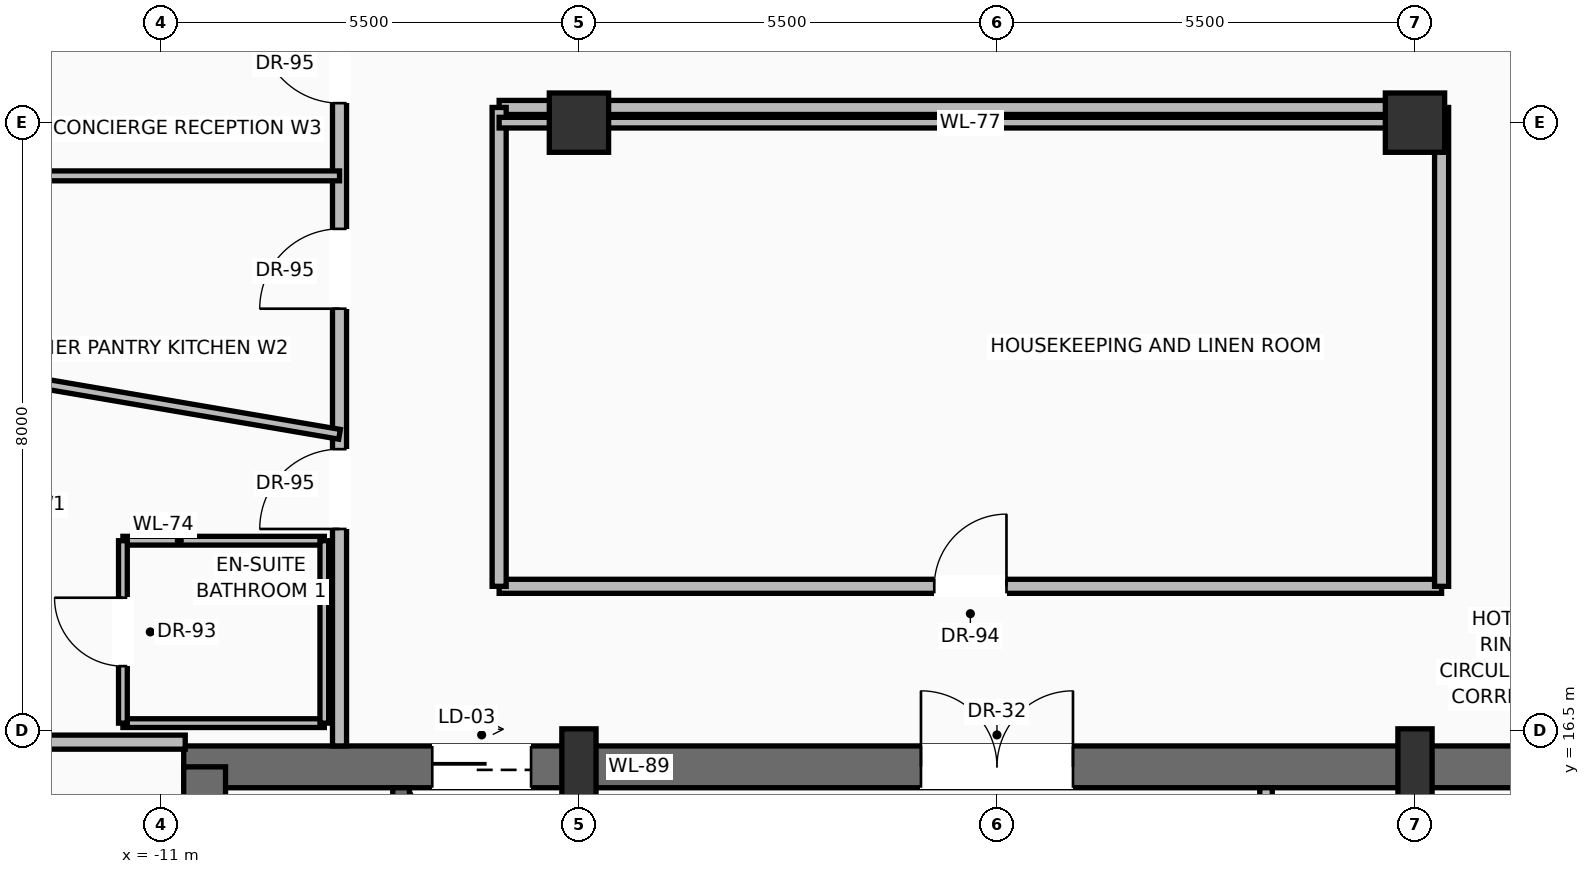
"""IFC4 building model, lengths in metres.
Left out: names, types, materials, properties, quantities, classifications, styles, units other than length and angle.
Written with IfcOpenShell. Run it as: python <this file> out.ifc"""

import sys

from ifc_helpers import new_model, si_unit, direction, frame, frame_2d, origin, origin_2d, place, context, subcontext, project, spatial, rectangle, extrude, source, transform, mapped, element, fill, save


model = new_model("IFC4")
c1 = context("Model", 3, precision=1e-05, world=origin(), true_north=direction((0.0, 1.0)))
c2 = subcontext(c1, "Body", "Model", "MODEL_VIEW")
j1 = project(units=[si_unit("LENGTHUNIT", "METRE"), si_unit("PLANEANGLEUNIT", "RADIAN")], contexts=[c1])
p1 = place(None, origin())
s1 = spatial("IfcSite", under=j1, at=p1, CompositionType="ELEMENT")
p2 = place(p1, origin())
s2 = spatial("IfcBuilding", under=s1, at=p2, CompositionType="ELEMENT")
p3 = place(p2, frame((0.0, 0.0, 237.25)))
s3 = spatial("IfcBuildingStorey", under=s2, at=p3, CompositionType="ELEMENT", Elevation=237.25)
p4 = place(p3, frame((-10.7, 16.025, 0.0), z_axis=(0.0, 0.0, 1.0), x_axis=(1.0, 0.0, 0.0)))
e1 = element("IfcWall", 1, at=p4, inside=s3, PredefinedType="SHEAR", context=c2, shape_type="SweptSolid", body=[
    extrude(rectangle(XDim=21.4, YDim=0.55, at=frame_2d((10.7, 0.0))), origin(), (0.0, 0.0, 1.0), 3.24),
])
p5 = place(p4, frame((3.27, 0.0, 0.0)))
e2 = element("IfcOpeningElement", 2, at=p5, cuts=e1, PredefinedType="OPENING", context=c2, shape_type="SweptSolid", body=[
    extrude(rectangle(XDim=1.3, YDim=2.3, at=frame_2d((0.65, 1.15))), frame((0.0, 0.285, 0.0), z_axis=(0.0, -1.0, 0.0), x_axis=(1.0, 0.0, 0.0)), (0.0, 0.0, 1.0), 0.57),
])
p6 = place(p4, frame((9.7, 0.0, 0.0)))
e3 = element("IfcOpeningElement", 3, at=p6, cuts=e1, PredefinedType="OPENING", context=c2, shape_type="SweptSolid", body=[
    extrude(rectangle(XDim=2.0, YDim=2.4, at=frame_2d((1.0, 1.2))), frame((0.0, 0.285, 0.0), z_axis=(0.0, -1.0, 0.0), x_axis=(1.0, 0.0, 0.0)), (0.0, 0.0, 1.0), 0.57),
])
p7 = place(p3, frame((-10.425, 0.575, 0.0), z_axis=(0.0, 0.0, 1.0), x_axis=(0.0, 1.0, 0.0)))
e4 = element("IfcWall", 4, at=p7, inside=s3, PredefinedType="SHEAR", context=c2, shape_type="SweptSolid", body=[
    extrude(rectangle(XDim=15.45, YDim=0.55, at=frame_2d((7.725, 0.0))), origin(), (0.0, 0.0, 1.0), 3.24),
])
p8 = place(p3, frame((-5.5, 0.575, 0.0), z_axis=(0.0, 0.0, 1.0), x_axis=(0.0, 1.0, 0.0)))
e5 = element("IfcWall", 5, at=p8, inside=s3, PredefinedType="SHEAR", context=c2, shape_type="SweptSolid", body=[
    extrude(rectangle(XDim=15.45, YDim=0.4, at=frame_2d((7.725, 0.0))), origin(), (0.0, 0.0, 1.0), 3.24),
])
p9 = place(p8, frame((8.925, 0.0, 0.0)))
e6 = element("IfcOpeningElement", 6, at=p9, cuts=e5, PredefinedType="OPENING", context=c2, shape_type="SweptSolid", body=[
    extrude(rectangle(XDim=1.1, YDim=2.2, at=frame_2d((0.55, 1.1))), frame((0.0, 0.21, 0.0), z_axis=(0.0, -1.0, 0.0), x_axis=(1.0, 0.0, 0.0)), (0.0, 0.0, 1.0), 0.42),
])
p10 = place(p3, frame((5.5, 0.575, 0.0), z_axis=(0.0, 0.0, 1.0), x_axis=(0.0, 1.0, 0.0)))
e7 = element("IfcWall", 7, at=p10, inside=s3, PredefinedType="SHEAR", context=c2, shape_type="SweptSolid", body=[
    extrude(rectangle(XDim=15.45, YDim=0.4, at=frame_2d((7.725, 0.0))), origin(), (0.0, 0.0, 1.0), 3.24),
])
p11 = place(p10, frame((8.925, 0.0, 0.0)))
e8 = element("IfcOpeningElement", 8, at=p11, cuts=e7, PredefinedType="OPENING", context=c2, shape_type="SweptSolid", body=[
    extrude(rectangle(XDim=1.1, YDim=2.2, at=frame_2d((0.55, 1.1))), frame((0.0, 0.21, 0.0), z_axis=(0.0, -1.0, 0.0), x_axis=(1.0, 0.0, 0.0)), (0.0, 0.0, 1.0), 0.42),
])
m1 = source(origin(), c2, "Body", "SweptSolid", [
    extrude(rectangle(XDim=0.45, YDim=0.95, at=origin_2d()), origin(), (0.0, 0.0, 1.0), 3.45),
])
for number, where, z_axis, x_axis in (
    (9, (-5.5, 16.05, 0.0), (0.0, 0.0, 1.0), (1.0, 0.0, 0.0)),
    (10, (5.5, 16.05, 0.0), (0.0, 0.0, 1.0), (1.0, 0.0, 0.0)),
):
    element("IfcColumn", number, at=place(p3, frame(where, z_axis=z_axis, x_axis=x_axis)), inside=s3, PredefinedType="PILASTER", context=c2, shape_type="MappedRepresentation", body=[
        mapped(m1, transform((0.0, 0.0, 0.0), scale=1.0)),
    ])
m2 = source(origin(), c2, "Body", "SweptSolid", [
    extrude(rectangle(XDim=0.78, YDim=0.78, at=origin_2d()), origin(), (0.0, 0.0, 1.0), 3.45),
])
for number, where, z_axis, x_axis in (
    (11, (-5.5, 24.5, 0.0), (0.0, 0.0, 1.0), (1.0, 0.0, 0.0)),
    (12, (5.5, 24.5, 0.0), (0.0, 0.0, 1.0), (1.0, 0.0, 0.0)),
):
    element("IfcColumn", number, at=place(p3, frame(where, z_axis=z_axis, x_axis=x_axis)), inside=s3, PredefinedType="COLUMN", context=c2, shape_type="MappedRepresentation", body=[
        mapped(m2, transform((0.0, 0.0, 0.0), scale=1.0)),
    ])
p12 = place(p3, frame((-19.43, 15.137, 0.0), z_axis=(0.0, 0.0, 1.0), x_axis=(0.508699873742, 0.860943922944, 0.0)))
e13 = element("IfcWall", 13, at=p12, inside=s3, PredefinedType="SOLIDWALL", context=c2, shape_type="SweptSolid", body=[
    extrude(rectangle(XDim=19.559, YDim=0.28, at=frame_2d((9.779, 0.0))), origin(), (0.0, 0.0, 1.0), 2.82),
])
p13 = place(p12, frame((4.694, 0.0, 0.0)))
e14 = element("IfcOpeningElement", 14, at=p13, cuts=e13, PredefinedType="OPENING", context=c2, shape_type="SweptSolid", body=[
    extrude(rectangle(XDim=1.6, YDim=2.35, at=frame_2d((0.8, 1.175))), frame((0.0, 0.15, 0.0), z_axis=(0.0, -1.0, 0.0), x_axis=(1.0, 0.0, 0.0)), (0.0, 0.0, 1.0), 0.3),
])
p14 = place(p12, frame((13.3, 0.0, 0.9)))
e15 = element("IfcOpeningElement", 15, at=p14, cuts=e13, PredefinedType="OPENING", context=c2, shape_type="SweptSolid", body=[
    extrude(rectangle(XDim=1.55, YDim=1.75, at=frame_2d((0.775, 0.875))), frame((0.0, 0.15, 0.0), z_axis=(0.0, -1.0, 0.0), x_axis=(1.0, 0.0, 0.0)), (0.0, 0.0, 1.0), 0.3),
])
p15 = place(p3, frame((-7.84, 11.87, 0.0), z_axis=(0.0, 0.0, 1.0), x_axis=(0.0, 1.0, 0.0)))
e16 = element("IfcWall", 16, at=p15, inside=s3, PredefinedType="SOLIDWALL", context=c2, shape_type="SweptSolid", body=[
    extrude(rectangle(XDim=3.88, YDim=0.22, at=frame_2d((1.94, 0.0))), origin(), (0.0, 0.0, 1.0), 3.24),
])
p16 = place(p3, frame((3.54, 11.22, 0.0), z_axis=(0.0, 0.0, 1.0), x_axis=(0.0, 1.0, 0.0)))
e17 = element("IfcWall", 17, at=p16, inside=s3, PredefinedType="PARTITIONING", context=c2, shape_type="SweptSolid", body=[
    extrude(rectangle(XDim=4.53, YDim=0.165, at=frame_2d((2.265, 0.0))), origin(), (0.0, 0.0, 1.0), 3.232),
])
p17 = place(p16, frame((1.25, 0.0, 0.0)))
e18 = element("IfcOpeningElement", 18, at=p17, cuts=e17, PredefinedType="OPENING", context=c2, shape_type="SweptSolid", body=[
    extrude(rectangle(XDim=0.9, YDim=2.1, at=frame_2d((0.45, 1.05))), frame((0.0, 0.093, 0.0), z_axis=(0.0, -1.0, 0.0), x_axis=(1.0, 0.0, 0.0)), (0.0, 0.0, 1.0), 0.185),
])
p18 = place(p3, frame((-6.55, 18.4, 0.0), z_axis=(0.0, 0.0, 1.0), x_axis=(1.0, 0.0, 0.0)))
e19 = element("IfcWall", 19, at=p18, inside=s3, PredefinedType="PARTITIONING", context=c2, shape_type="SweptSolid", body=[
    extrude(rectangle(XDim=12.4, YDim=0.185, at=frame_2d((6.2, 0.0))), origin(), (0.0, 0.0, 1.0), 3.232),
])
p19 = place(p18, frame((5.725, 0.0, 0.0)))
e20 = element("IfcOpeningElement", 20, at=p19, cuts=e19, PredefinedType="OPENING", context=c2, shape_type="SweptSolid", body=[
    extrude(rectangle(XDim=0.95, YDim=2.2, at=frame_2d((0.475, 1.1))), frame((0.0, 0.103, 0.0), z_axis=(0.0, -1.0, 0.0), x_axis=(1.0, 0.0, 0.0)), (0.0, 0.0, 1.0), 0.205),
])
p20 = place(p3, frame((-6.55, 24.7, 0.0), z_axis=(0.0, 0.0, 1.0), x_axis=(1.0, 0.0, 0.0)))
e21 = element("IfcWall", 21, at=p20, inside=s3, PredefinedType="PARTITIONING", context=c2, shape_type="SweptSolid", body=[
    extrude(rectangle(XDim=12.4, YDim=0.185, at=frame_2d((6.2, 0.0))), origin(), (0.0, 0.0, 1.0), 2.683),
])
for number, where, z_axis, x_axis in (
    (22, (-6.55, 18.4, 0.0), (0.0, 0.0, 1.0), (0.0, 1.0, 0.0)),
    (23, (5.85, 18.4, 0.0), (0.0, 0.0, 1.0), (0.0, 1.0, 0.0)),
):
    element("IfcWall", number, at=place(p3, frame(where, z_axis=z_axis, x_axis=x_axis)), inside=s3, PredefinedType="PARTITIONING", context=c2, shape_type="SweptSolid", body=[
        extrude(rectangle(XDim=6.3, YDim=0.185, at=frame_2d((3.15, 0.0))), origin(), (0.0, 0.0, 1.0), 3.232),
    ])
p21 = place(p3, frame((-8.65, 16.3, 0.0), z_axis=(0.0, 0.0, 1.0), x_axis=(0.0, 1.0, 0.0)))
e24 = element("IfcWall", 24, at=p21, inside=s3, PredefinedType="PARTITIONING", context=c2, shape_type="SweptSolid", body=[
    extrude(rectangle(XDim=10.5, YDim=0.185, at=frame_2d((5.25, 0.0))), origin(), (0.0, 0.0, 1.0), 3.232),
])
p22 = place(p21, frame((2.854, 0.0, 0.0)))
e25 = element("IfcOpeningElement", 25, at=p22, cuts=e24, PredefinedType="OPENING", context=c2, shape_type="SweptSolid", body=[
    extrude(rectangle(XDim=1.05, YDim=2.25, at=frame_2d((0.525, 1.125))), frame((0.0, 0.103, 0.0), z_axis=(0.0, -1.0, 0.0), x_axis=(1.0, 0.0, 0.0)), (0.0, 0.0, 1.0), 0.205),
])
p23 = place(p21, frame((5.752, 0.0, 0.0)))
e26 = element("IfcOpeningElement", 26, at=p23, cuts=e24, PredefinedType="OPENING", context=c2, shape_type="SweptSolid", body=[
    extrude(rectangle(XDim=1.05, YDim=2.25, at=frame_2d((0.525, 1.125))), frame((0.0, 0.103, 0.0), z_axis=(0.0, -1.0, 0.0), x_axis=(1.0, 0.0, 0.0)), (0.0, 0.0, 1.0), 0.205),
])
p24 = place(p21, frame((8.457, 0.0, 0.0)))
e27 = element("IfcOpeningElement", 27, at=p24, cuts=e24, PredefinedType="OPENING", context=c2, shape_type="SweptSolid", body=[
    extrude(rectangle(XDim=1.05, YDim=2.25, at=frame_2d((0.525, 1.125))), frame((0.0, 0.103, 0.0), z_axis=(0.0, -1.0, 0.0), x_axis=(1.0, 0.0, 0.0)), (0.0, 0.0, 1.0), 0.205),
])
p25 = place(p3, frame((-6.55, 24.5, 0.0), z_axis=(0.0, 0.0, 1.0), x_axis=(1.0, 0.0, 0.0)))
e28 = element("IfcWall", 28, at=p25, inside=s3, PredefinedType="PARTITIONING", context=c2, shape_type="SweptSolid", body=[
    extrude(rectangle(XDim=12.4, YDim=0.14, at=frame_2d((6.2, 0.0))), origin(), (0.0, 0.0, 1.0), 2.683),
])
p26 = place(p3, frame((-18.865, 16.35, 0.0), z_axis=(0.0, 0.0, 1.0), x_axis=(1.0, 0.0, 0.0)))
e29 = element("IfcWall", 29, at=p26, inside=s3, PredefinedType="PARTITIONING", context=c2, shape_type="SweptSolid", body=[
    extrude(rectangle(XDim=8.185, YDim=0.185, at=frame_2d((4.092, 0.0))), origin(), (0.0, 0.0, 1.0), 3.232),
])
p27 = place(p26, frame((4.693, 0.0, 0.0)))
e30 = element("IfcOpeningElement", 30, at=p27, cuts=e29, PredefinedType="OPENING", context=c2, shape_type="SweptSolid", body=[
    extrude(rectangle(XDim=1.05, YDim=2.25, at=frame_2d((0.525, 1.125))), frame((0.0, 0.103, 0.0), z_axis=(0.0, -1.0, 0.0), x_axis=(1.0, 0.0, 0.0)), (0.0, 0.0, 1.0), 0.205),
])
for number, where, z_axis, x_axis in (
    (31, (-11.5, 16.6, 0.0), (0.0, 0.0, 1.0), (1.0, 0.0, 0.0)),
    (32, (-11.5, 19.0, 0.0), (0.0, 0.0, 1.0), (1.0, 0.0, 0.0)),
):
    element("IfcWall", number, at=place(p3, frame(where, z_axis=z_axis, x_axis=x_axis)), inside=s3, PredefinedType="PARTITIONING", context=c2, shape_type="SweptSolid", body=[
        extrude(rectangle(XDim=2.65, YDim=0.115, at=frame_2d((1.325, 0.0))), origin(), (0.0, 0.0, 1.0), 3.232),
    ])
p28 = place(p3, frame((-11.5, 16.6, 0.0), z_axis=(0.0, 0.0, 1.0), x_axis=(0.0, 1.0, 0.0)))
e33 = element("IfcWall", 33, at=p28, inside=s3, PredefinedType="PARTITIONING", context=c2, shape_type="SweptSolid", body=[
    extrude(rectangle(XDim=2.4, YDim=0.115, at=frame_2d((1.2, 0.0))), origin(), (0.0, 0.0, 1.0), 3.232),
])
p29 = place(p28, frame((0.75, 0.0, 0.0)))
e34 = element("IfcOpeningElement", 34, at=p29, cuts=e33, PredefinedType="OPENING", context=c2, shape_type="SweptSolid", body=[
    extrude(rectangle(XDim=0.9, YDim=2.15, at=frame_2d((0.45, 1.075))), frame((0.0, 0.067, 0.0), z_axis=(0.0, -1.0, 0.0), x_axis=(1.0, 0.0, 0.0)), (0.0, 0.0, 1.0), 0.135),
])
p30 = place(p3, frame((-8.85, 16.6, 0.0), z_axis=(0.0, 0.0, 1.0), x_axis=(0.0, 1.0, 0.0)))
e35 = element("IfcWall", 35, at=p30, inside=s3, PredefinedType="PARTITIONING", context=c2, shape_type="SweptSolid", body=[
    extrude(rectangle(XDim=2.4, YDim=0.115, at=frame_2d((1.2, 0.0))), origin(), (0.0, 0.0, 1.0), 3.232),
])
p31 = place(p3, frame((-15.755, 21.613, 0.0), z_axis=(0.0, 0.0, 1.0), x_axis=(0.985747524056, -0.1682314442, 0.0)))
e36 = element("IfcWall", 36, at=p31, inside=s3, PredefinedType="PARTITIONING", context=c2, shape_type="SweptSolid", body=[
    extrude(rectangle(XDim=7.208, YDim=0.13, at=frame_2d((3.604, 0.0))), origin(), (0.0, 0.0, 1.0), 3.232),
])
p32 = place(p3, frame((-14.463, 23.8, 0.0), z_axis=(0.0, 0.0, 1.0), x_axis=(1.0, 0.0, 0.0)))
e37 = element("IfcWall", 37, at=p32, inside=s3, PredefinedType="PARTITIONING", context=c2, shape_type="SweptSolid", body=[
    extrude(rectangle(XDim=5.813, YDim=0.13, at=frame_2d((2.906, 0.0))), origin(), (0.0, 0.0, 1.0), 3.232),
])
m3 = source(origin(), c2, "Body", "SweptSolid", [
    extrude(rectangle(XDim=1.3, YDim=2.3, at=frame_2d((0.65, 1.15))), frame((0.0, 0.025, 0.0), z_axis=(0.0, -1.0, 0.0), x_axis=(1.0, 0.0, 0.0)), (0.0, 0.0, 1.0), 0.05),
])
p33 = place(p5, origin())
e38 = element("IfcDoor", 38, at=p33, inside=s3, OperationType="SLIDING_TO_RIGHT", PredefinedType="DOOR", context=c2, shape_type="MappedRepresentation", body=[
    mapped(m3, transform((0.0, 0.0, 0.0), scale=1.0)),
])
fill(e2, e38)
m4 = source(origin(), c2, "Body", "SweptSolid", [
    extrude(rectangle(XDim=2.0, YDim=2.4, at=frame_2d((1.0, 1.2))), frame((0.0, 0.025, 0.0), z_axis=(0.0, -1.0, 0.0), x_axis=(1.0, 0.0, 0.0)), (0.0, 0.0, 1.0), 0.05),
])
p34 = place(p6, origin())
e39 = element("IfcDoor", 39, at=p34, inside=s3, OperationType="DOUBLE_DOOR_SINGLE_SWING", PredefinedType="DOOR", context=c2, shape_type="MappedRepresentation", body=[
    mapped(m4, transform((0.0, 0.0, 0.0), scale=1.0)),
])
fill(e3, e39)
m5 = source(origin(), c2, "Body", "SweptSolid", [
    extrude(rectangle(XDim=0.95, YDim=2.2, at=frame_2d((0.475, 1.1))), frame((0.0, 0.025, 0.0), z_axis=(0.0, -1.0, 0.0), x_axis=(1.0, 0.0, 0.0)), (0.0, 0.0, 1.0), 0.05),
])
p35 = place(p19, origin())
e40 = element("IfcDoor", 40, at=p35, inside=s3, OperationType="SINGLE_SWING_RIGHT", PredefinedType="DOOR", context=c2, shape_type="MappedRepresentation", body=[
    mapped(m5, transform((0.0, 0.0, 0.0), scale=1.0)),
])
fill(e20, e40)
m6 = source(origin(), c2, "Body", "SweptSolid", [
    extrude(rectangle(XDim=1.05, YDim=2.25, at=frame_2d((0.525, 1.125))), frame((0.0, 0.025, 0.0), z_axis=(0.0, -1.0, 0.0), x_axis=(1.0, 0.0, 0.0)), (0.0, 0.0, 1.0), 0.05),
])
p36 = place(p22, origin())
e41 = element("IfcDoor", 41, at=p36, inside=s3, OperationType="SINGLE_SWING_LEFT", PredefinedType="DOOR", context=c2, shape_type="MappedRepresentation", body=[
    mapped(m6, transform((0.0, 0.0, 0.0), scale=1.0)),
])
fill(e25, e41)
m7 = source(origin(), c2, "Body", "SweptSolid", [
    extrude(rectangle(XDim=0.9, YDim=2.15, at=frame_2d((0.45, 1.075))), frame((0.0, 0.025, 0.0), z_axis=(0.0, -1.0, 0.0), x_axis=(1.0, 0.0, 0.0)), (0.0, 0.0, 1.0), 0.05),
])
p37 = place(p29, origin())
e42 = element("IfcDoor", 42, at=p37, inside=s3, OperationType="SINGLE_SWING_RIGHT", PredefinedType="DOOR", context=c2, shape_type="MappedRepresentation", body=[
    mapped(m7, transform((0.0, 0.0, 0.0), scale=1.0)),
])
fill(e34, e42)
p38 = place(p23, origin())
e43 = element("IfcDoor", 43, at=p38, inside=s3, OperationType="SINGLE_SWING_LEFT", PredefinedType="DOOR", context=c2, shape_type="MappedRepresentation", body=[
    mapped(m6, transform((0.0, 0.0, 0.0), scale=1.0)),
])
fill(e26, e43)
p39 = place(p24, origin())
e44 = element("IfcDoor", 44, at=p39, inside=s3, OperationType="SINGLE_SWING_RIGHT", PredefinedType="DOOR", context=c2, shape_type="MappedRepresentation", body=[
    mapped(m6, transform((0.0, 0.0, 0.0), scale=1.0)),
])
fill(e27, e44)
save(model, sys.argv[1])
